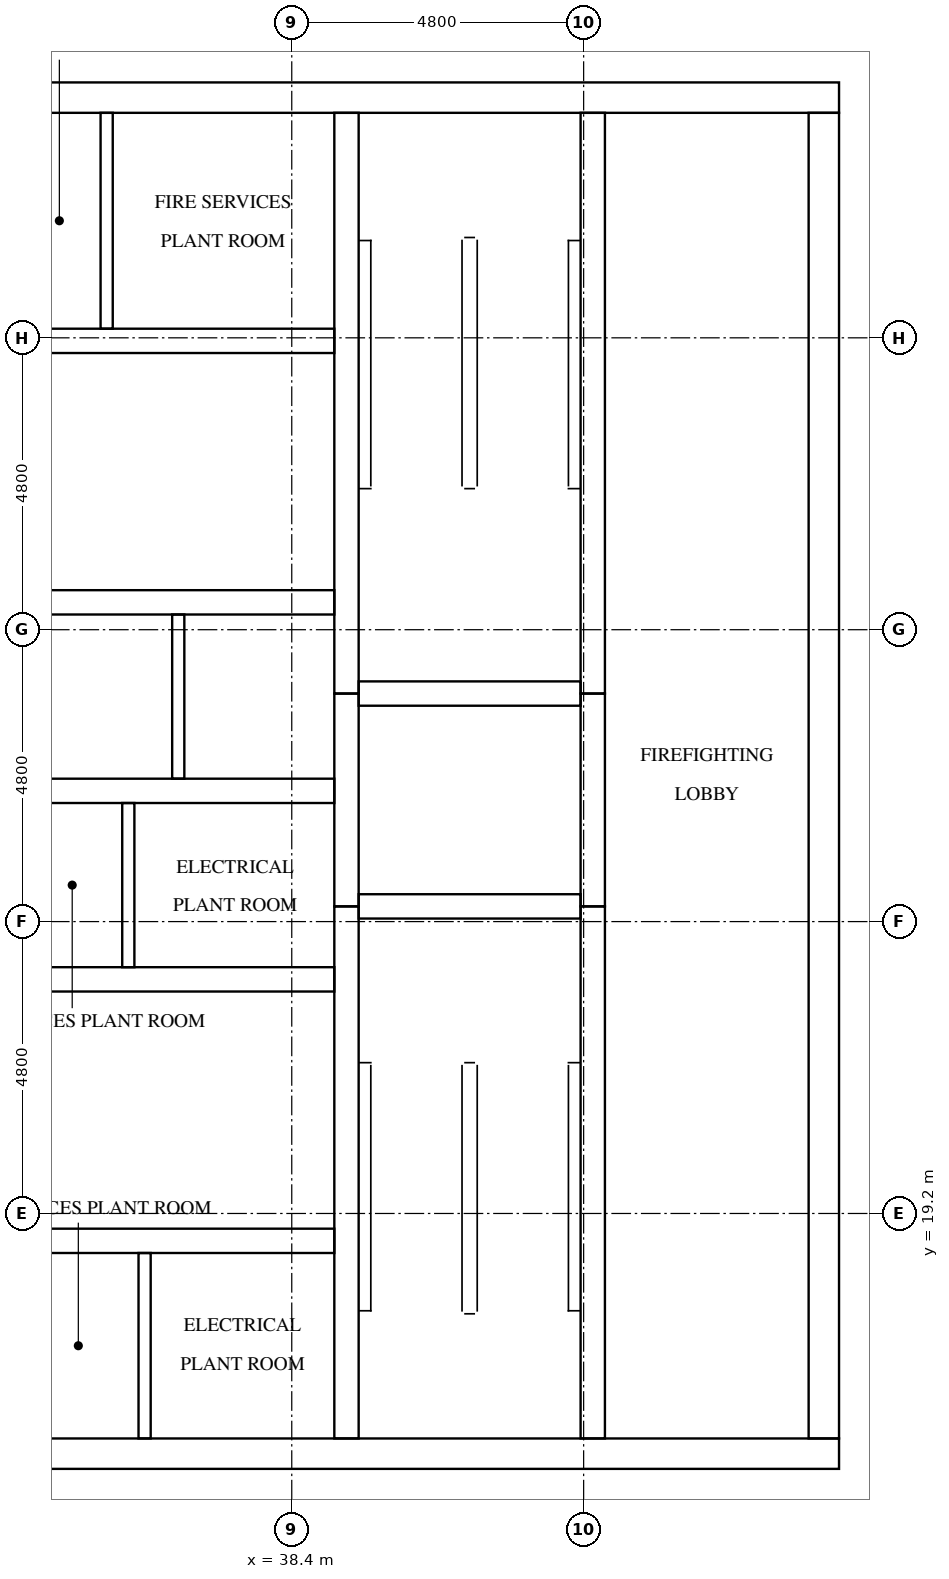
"""IFC4 building model, lengths in metres.
Left out: names, types, materials, properties, quantities, classifications, styles, units other than length and angle.
Written with IfcOpenShell. Run it as: python <this file> out.ifc"""

import sys

from ifc_helpers import new_model, si_unit, direction, frame, frame_2d, origin, place, context, subcontext, project, spatial, rectangle, extrude, element, fill, save


model = new_model("IFC4")
c1 = context("Model", 3, precision=1e-05, world=origin(), true_north=direction((0.0, 1.0)))
c2 = subcontext(c1, "Body", "Model", "MODEL_VIEW")
j1 = project(units=[si_unit("LENGTHUNIT", "METRE"), si_unit("PLANEANGLEUNIT", "RADIAN")], contexts=[c1])
p1 = place(None, origin())
s1 = spatial("IfcSite", under=j1, at=p1, CompositionType="ELEMENT")
p2 = place(p1, origin())
s2 = spatial("IfcBuilding", under=s1, at=p2, CompositionType="ELEMENT")
p3 = place(p2, frame((0.0, 0.0, 291.5)))
s3 = spatial("IfcBuildingStorey", under=s2, at=p3, CompositionType="ELEMENT", Elevation=291.5)
p4 = place(p3, frame((15.0, 15.25, 0.0), z_axis=(0.0, 0.0, 1.0), x_axis=(1.0, 0.0, 0.0)))
e1 = element("IfcWall", 1, at=p4, inside=s3, PredefinedType="SHEAR", context=c2, shape_type="SweptSolid", body=[
    extrude(rectangle(XDim=32.4, YDim=0.5, at=frame_2d((16.2, 0.0))), origin(), (0.0, 0.0, 1.0), 4.4),
])
p5 = place(p4, frame((15.3, 0.0, 0.0)))
e2 = element("IfcOpeningElement", 2, at=p5, cuts=e1, PredefinedType="OPENING", context=c2, shape_type="SweptSolid", body=[
    extrude(rectangle(XDim=1.8, YDim=2.1, at=frame_2d((0.9, 1.05))), frame((0.0, 0.26, 0.0), z_axis=(0.0, -1.0, 0.0), x_axis=(1.0, 0.0, 0.0)), (0.0, 0.0, 1.0), 0.52),
])
p6 = place(p3, frame((15.0, 37.55, 0.0), z_axis=(0.0, 0.0, 1.0), x_axis=(1.0, 0.0, 0.0)))
e3 = element("IfcWall", 3, at=p6, inside=s3, PredefinedType="SHEAR", context=c2, shape_type="SweptSolid", body=[
    extrude(rectangle(XDim=32.4, YDim=0.5, at=frame_2d((16.2, 0.0))), origin(), (0.0, 0.0, 1.0), 4.4),
])
p7 = place(p6, frame((15.3, 0.0, 0.0)))
e4 = element("IfcOpeningElement", 4, at=p7, cuts=e3, PredefinedType="OPENING", context=c2, shape_type="SweptSolid", body=[
    extrude(rectangle(XDim=1.8, YDim=2.1, at=frame_2d((0.9, 1.05))), frame((0.0, 0.26, 0.0), z_axis=(0.0, -1.0, 0.0), x_axis=(1.0, 0.0, 0.0)), (0.0, 0.0, 1.0), 0.52),
])
p8 = place(p6, frame((1.282, 0.0, 0.0)))
e5 = element("IfcOpeningElement", 5, at=p8, cuts=e3, PredefinedType="OPENING", context=c2, shape_type="SweptSolid", body=[
    extrude(rectangle(XDim=1.0, YDim=2.1, at=frame_2d((0.5, 1.05))), frame((0.0, 0.26, 0.0), z_axis=(0.0, -1.0, 0.0), x_axis=(1.0, 0.0, 0.0)), (0.0, 0.0, 1.0), 0.52),
])
p9 = place(p6, frame((5.082, 0.0, 0.0)))
e6 = element("IfcOpeningElement", 6, at=p9, cuts=e3, PredefinedType="OPENING", context=c2, shape_type="SweptSolid", body=[
    extrude(rectangle(XDim=1.0, YDim=2.1, at=frame_2d((0.5, 1.05))), frame((0.0, 0.26, 0.0), z_axis=(0.0, -1.0, 0.0), x_axis=(1.0, 0.0, 0.0)), (0.0, 0.0, 1.0), 0.52),
])
p10 = place(p3, frame((47.15, 15.5, 0.0), z_axis=(0.0, 0.0, 1.0), x_axis=(0.0, 1.0, 0.0)))
e7 = element("IfcWall", 7, at=p10, inside=s3, PredefinedType="SHEAR", context=c2, shape_type="SweptSolid", body=[
    extrude(rectangle(XDim=21.8, YDim=0.5, at=frame_2d((10.9, 0.0))), origin(), (0.0, 0.0, 1.0), 4.4),
])
p11 = place(p10, frame((10.6, 0.0, 0.0)))
e8 = element("IfcOpeningElement", 8, at=p11, cuts=e7, PredefinedType="OPENING", context=c2, shape_type="SweptSolid", body=[
    extrude(rectangle(XDim=1.2, YDim=2.1, at=frame_2d((0.6, 1.05))), frame((0.0, 0.26, 0.0), z_axis=(0.0, -1.0, 0.0), x_axis=(1.0, 0.0, 0.0)), (0.0, 0.0, 1.0), 0.52),
])
p12 = place(p3, frame((39.3, 15.5, 0.0), z_axis=(0.0, 0.0, 1.0), x_axis=(0.0, 1.0, 0.0)))
e9 = element("IfcWall", 9, at=p12, inside=s3, PredefinedType="SHEAR", context=c2, shape_type="SweptSolid", body=[
    extrude(rectangle(XDim=8.75, YDim=0.4, at=frame_2d((4.375, 0.0))), origin(), (0.0, 0.0, 1.0), 4.4),
])
p13 = place(p3, frame((39.3, 24.25, 0.0), z_axis=(0.0, 0.0, 1.0), x_axis=(0.0, 1.0, 0.0)))
e10 = element("IfcWall", 10, at=p13, inside=s3, PredefinedType="SHEAR", context=c2, shape_type="SweptSolid", body=[
    extrude(rectangle(XDim=3.5, YDim=0.4, at=frame_2d((1.75, 0.0))), origin(), (0.0, 0.0, 1.0), 4.4),
])
p14 = place(p3, frame((39.3, 27.75, 0.0), z_axis=(0.0, 0.0, 1.0), x_axis=(0.0, 1.0, 0.0)))
e11 = element("IfcWall", 11, at=p14, inside=s3, PredefinedType="SHEAR", context=c2, shape_type="SweptSolid", body=[
    extrude(rectangle(XDim=9.55, YDim=0.4, at=frame_2d((4.775, 0.0))), origin(), (0.0, 0.0, 1.0), 4.4),
])
p15 = place(p3, frame((43.35, 15.5, 0.0), z_axis=(0.0, 0.0, 1.0), x_axis=(0.0, 1.0, 0.0)))
e12 = element("IfcWall", 12, at=p15, inside=s3, PredefinedType="SHEAR", context=c2, shape_type="SweptSolid", body=[
    extrude(rectangle(XDim=8.75, YDim=0.4, at=frame_2d((4.375, 0.0))), origin(), (0.0, 0.0, 1.0), 4.4),
])
p16 = place(p15, frame((0.7, 0.0, 0.0)))
e13 = element("IfcOpeningElement", 13, at=p16, cuts=e12, PredefinedType="OPENING", context=c2, shape_type="SweptSolid", body=[
    extrude(rectangle(XDim=1.2, YDim=2.1, at=frame_2d((0.6, 1.05))), frame((0.0, 0.21, 0.0), z_axis=(0.0, -1.0, 0.0), x_axis=(1.0, 0.0, 0.0)), (0.0, 0.0, 1.0), 0.42),
])
p17 = place(p3, frame((43.35, 24.25, 0.0), z_axis=(0.0, 0.0, 1.0), x_axis=(0.0, 1.0, 0.0)))
e14 = element("IfcWall", 14, at=p17, inside=s3, PredefinedType="SHEAR", context=c2, shape_type="SweptSolid", body=[
    extrude(rectangle(XDim=3.5, YDim=0.4, at=frame_2d((1.75, 0.0))), origin(), (0.0, 0.0, 1.0), 4.4),
])
p18 = place(p17, frame((1.2, 0.0, 0.0)))
e15 = element("IfcOpeningElement", 15, at=p18, cuts=e14, PredefinedType="OPENING", context=c2, shape_type="SweptSolid", body=[
    extrude(rectangle(XDim=1.1, YDim=2.1, at=frame_2d((0.55, 1.05))), frame((0.0, 0.21, 0.0), z_axis=(0.0, -1.0, 0.0), x_axis=(1.0, 0.0, 0.0)), (0.0, 0.0, 1.0), 0.42),
])
p19 = place(p3, frame((43.35, 27.75, 0.0), z_axis=(0.0, 0.0, 1.0), x_axis=(0.0, 1.0, 0.0)))
e16 = element("IfcWall", 16, at=p19, inside=s3, PredefinedType="SHEAR", context=c2, shape_type="SweptSolid", body=[
    extrude(rectangle(XDim=9.55, YDim=0.4, at=frame_2d((4.775, 0.0))), origin(), (0.0, 0.0, 1.0), 4.4),
])
p20 = place(p19, frame((7.65, 0.0, 0.0)))
e17 = element("IfcOpeningElement", 17, at=p20, cuts=e16, PredefinedType="OPENING", context=c2, shape_type="SweptSolid", body=[
    extrude(rectangle(XDim=1.2, YDim=2.1, at=frame_2d((0.6, 1.05))), frame((0.0, 0.21, 0.0), z_axis=(0.0, -1.0, 0.0), x_axis=(1.0, 0.0, 0.0)), (0.0, 0.0, 1.0), 0.42),
])
for number, where, z_axis, x_axis in (
    (18, (39.5, 24.25, 0.0), (0.0, 0.0, 1.0), (1.0, 0.0, 0.0)),
    (19, (39.5, 27.75, 0.0), (0.0, 0.0, 1.0), (1.0, 0.0, 0.0)),
):
    element("IfcWall", number, at=place(p3, frame(where, z_axis=z_axis, x_axis=x_axis)), inside=s3, PredefinedType="SHEAR", context=c2, shape_type="SweptSolid", body=[
        extrude(rectangle(XDim=3.65, YDim=0.4, at=frame_2d((1.825, 0.0))), origin(), (0.0, 0.0, 1.0), 4.4),
    ])
p21 = place(p3, frame((33.5, 18.75, 0.0), z_axis=(0.0, 0.0, 1.0), x_axis=(1.0, 0.0, 0.0)))
e20 = element("IfcWall", 20, at=p21, inside=s3, PredefinedType="SHEAR", context=c2, shape_type="SweptSolid", body=[
    extrude(rectangle(XDim=5.6, YDim=0.4, at=frame_2d((2.8, 0.0))), origin(), (0.0, 0.0, 1.0), 4.4),
])
p22 = place(p21, frame((0.89, 0.0, 0.0)))
e21 = element("IfcOpeningElement", 21, at=p22, cuts=e20, PredefinedType="OPENING", context=c2, shape_type="SweptSolid", body=[
    extrude(rectangle(XDim=1.0, YDim=2.1, at=frame_2d((0.5, 1.05))), frame((0.0, 0.21, 0.0), z_axis=(0.0, -1.0, 0.0), x_axis=(1.0, 0.0, 0.0)), (0.0, 0.0, 1.0), 0.42),
])
p23 = place(p21, frame((3.59, 0.0, 0.0)))
e22 = element("IfcOpeningElement", 22, at=p23, cuts=e20, PredefinedType="OPENING", context=c2, shape_type="SweptSolid", body=[
    extrude(rectangle(XDim=1.0, YDim=2.1, at=frame_2d((0.5, 1.05))), frame((0.0, 0.21, 0.0), z_axis=(0.0, -1.0, 0.0), x_axis=(1.0, 0.0, 0.0)), (0.0, 0.0, 1.0), 0.42),
])
p24 = place(p3, frame((23.3, 23.05, 0.0), z_axis=(0.0, 0.0, 1.0), x_axis=(1.0, 0.0, 0.0)))
e23 = element("IfcWall", 23, at=p24, inside=s3, PredefinedType="SHEAR", context=c2, shape_type="SweptSolid", body=[
    extrude(rectangle(XDim=15.8, YDim=0.4, at=frame_2d((7.9, 0.0))), origin(), (0.0, 0.0, 1.0), 4.4),
])
p25 = place(p24, frame((6.017, 0.0, 0.0)))
e24 = element("IfcOpeningElement", 24, at=p25, cuts=e23, PredefinedType="OPENING", context=c2, shape_type="SweptSolid", body=[
    extrude(rectangle(XDim=1.1, YDim=2.1, at=frame_2d((0.55, 1.05))), frame((0.0, 0.21, 0.0), z_axis=(0.0, -1.0, 0.0), x_axis=(1.0, 0.0, 0.0)), (0.0, 0.0, 1.0), 0.42),
])
p26 = place(p24, frame((8.683, 0.0, 0.0)))
e25 = element("IfcOpeningElement", 25, at=p26, cuts=e23, PredefinedType="OPENING", context=c2, shape_type="SweptSolid", body=[
    extrude(rectangle(XDim=1.1, YDim=2.1, at=frame_2d((0.55, 1.05))), frame((0.0, 0.21, 0.0), z_axis=(0.0, -1.0, 0.0), x_axis=(1.0, 0.0, 0.0)), (0.0, 0.0, 1.0), 0.42),
])
p27 = place(p24, frame((0.323, 0.0, 0.0)))
e26 = element("IfcOpeningElement", 26, at=p27, cuts=e23, PredefinedType="OPENING", context=c2, shape_type="SweptSolid", body=[
    extrude(rectangle(XDim=1.0, YDim=2.1, at=frame_2d((0.5, 1.05))), frame((0.0, 0.21, 0.0), z_axis=(0.0, -1.0, 0.0), x_axis=(1.0, 0.0, 0.0)), (0.0, 0.0, 1.0), 0.42),
])
p28 = place(p24, frame((2.989, 0.0, 0.0)))
e27 = element("IfcOpeningElement", 27, at=p28, cuts=e23, PredefinedType="OPENING", context=c2, shape_type="SweptSolid", body=[
    extrude(rectangle(XDim=1.0, YDim=2.1, at=frame_2d((0.5, 1.05))), frame((0.0, 0.21, 0.0), z_axis=(0.0, -1.0, 0.0), x_axis=(1.0, 0.0, 0.0)), (0.0, 0.0, 1.0), 0.42),
])
p29 = place(p24, frame((10.989, 0.0, 0.0)))
e28 = element("IfcOpeningElement", 28, at=p29, cuts=e23, PredefinedType="OPENING", context=c2, shape_type="SweptSolid", body=[
    extrude(rectangle(XDim=1.0, YDim=2.1, at=frame_2d((0.5, 1.05))), frame((0.0, 0.21, 0.0), z_axis=(0.0, -1.0, 0.0), x_axis=(1.0, 0.0, 0.0)), (0.0, 0.0, 1.0), 0.42),
])
p30 = place(p24, frame((13.656, 0.0, 0.0)))
e29 = element("IfcOpeningElement", 29, at=p30, cuts=e23, PredefinedType="OPENING", context=c2, shape_type="SweptSolid", body=[
    extrude(rectangle(XDim=1.0, YDim=2.1, at=frame_2d((0.5, 1.05))), frame((0.0, 0.21, 0.0), z_axis=(0.0, -1.0, 0.0), x_axis=(1.0, 0.0, 0.0)), (0.0, 0.0, 1.0), 0.42),
])
p31 = place(p3, frame((23.3, 26.15, 0.0), z_axis=(0.0, 0.0, 1.0), x_axis=(1.0, 0.0, 0.0)))
e30 = element("IfcWall", 30, at=p31, inside=s3, PredefinedType="SHEAR", context=c2, shape_type="SweptSolid", body=[
    extrude(rectangle(XDim=15.8, YDim=0.4, at=frame_2d((7.9, 0.0))), origin(), (0.0, 0.0, 1.0), 4.4),
])
p32 = place(p3, frame((23.3, 29.25, 0.0), z_axis=(0.0, 0.0, 1.0), x_axis=(1.0, 0.0, 0.0)))
e31 = element("IfcWall", 31, at=p32, inside=s3, PredefinedType="SHEAR", context=c2, shape_type="SweptSolid", body=[
    extrude(rectangle(XDim=15.8, YDim=0.4, at=frame_2d((7.9, 0.0))), origin(), (0.0, 0.0, 1.0), 4.4),
])
p33 = place(p32, frame((0.683, 0.0, 0.0)))
e32 = element("IfcOpeningElement", 32, at=p33, cuts=e31, PredefinedType="OPENING", context=c2, shape_type="SweptSolid", body=[
    extrude(rectangle(XDim=1.1, YDim=2.1, at=frame_2d((0.55, 1.05))), frame((0.0, 0.21, 0.0), z_axis=(0.0, -1.0, 0.0), x_axis=(1.0, 0.0, 0.0)), (0.0, 0.0, 1.0), 0.42),
])
p34 = place(p32, frame((3.35, 0.0, 0.0)))
e33 = element("IfcOpeningElement", 33, at=p34, cuts=e31, PredefinedType="OPENING", context=c2, shape_type="SweptSolid", body=[
    extrude(rectangle(XDim=1.1, YDim=2.1, at=frame_2d((0.55, 1.05))), frame((0.0, 0.21, 0.0), z_axis=(0.0, -1.0, 0.0), x_axis=(1.0, 0.0, 0.0)), (0.0, 0.0, 1.0), 0.42),
])
p35 = place(p32, frame((6.017, 0.0, 0.0)))
e34 = element("IfcOpeningElement", 34, at=p35, cuts=e31, PredefinedType="OPENING", context=c2, shape_type="SweptSolid", body=[
    extrude(rectangle(XDim=1.1, YDim=2.1, at=frame_2d((0.55, 1.05))), frame((0.0, 0.21, 0.0), z_axis=(0.0, -1.0, 0.0), x_axis=(1.0, 0.0, 0.0)), (0.0, 0.0, 1.0), 0.42),
])
p36 = place(p32, frame((8.683, 0.0, 0.0)))
e35 = element("IfcOpeningElement", 35, at=p36, cuts=e31, PredefinedType="OPENING", context=c2, shape_type="SweptSolid", body=[
    extrude(rectangle(XDim=1.1, YDim=2.1, at=frame_2d((0.55, 1.05))), frame((0.0, 0.21, 0.0), z_axis=(0.0, -1.0, 0.0), x_axis=(1.0, 0.0, 0.0)), (0.0, 0.0, 1.0), 0.42),
])
p37 = place(p32, frame((11.35, 0.0, 0.0)))
e36 = element("IfcOpeningElement", 36, at=p37, cuts=e31, PredefinedType="OPENING", context=c2, shape_type="SweptSolid", body=[
    extrude(rectangle(XDim=1.1, YDim=2.1, at=frame_2d((0.55, 1.05))), frame((0.0, 0.21, 0.0), z_axis=(0.0, -1.0, 0.0), x_axis=(1.0, 0.0, 0.0)), (0.0, 0.0, 1.0), 0.42),
])
p38 = place(p32, frame((14.017, 0.0, 0.0)))
e37 = element("IfcOpeningElement", 37, at=p38, cuts=e31, PredefinedType="OPENING", context=c2, shape_type="SweptSolid", body=[
    extrude(rectangle(XDim=1.1, YDim=2.1, at=frame_2d((0.55, 1.05))), frame((0.0, 0.21, 0.0), z_axis=(0.0, -1.0, 0.0), x_axis=(1.0, 0.0, 0.0)), (0.0, 0.0, 1.0), 0.42),
])
p39 = place(p3, frame((33.5, 33.55, 0.0), z_axis=(0.0, 0.0, 1.0), x_axis=(1.0, 0.0, 0.0)))
e38 = element("IfcWall", 38, at=p39, inside=s3, PredefinedType="SHEAR", context=c2, shape_type="SweptSolid", body=[
    extrude(rectangle(XDim=5.6, YDim=0.4, at=frame_2d((2.8, 0.0))), origin(), (0.0, 0.0, 1.0), 4.4),
])
p40 = place(p39, frame((0.578, 0.0, 0.0)))
e39 = element("IfcOpeningElement", 39, at=p40, cuts=e38, PredefinedType="OPENING", context=c2, shape_type="SweptSolid", body=[
    extrude(rectangle(XDim=1.0, YDim=2.1, at=frame_2d((0.5, 1.05))), frame((0.0, 0.21, 0.0), z_axis=(0.0, -1.0, 0.0), x_axis=(1.0, 0.0, 0.0)), (0.0, 0.0, 1.0), 0.42),
])
p41 = place(p39, frame((3.278, 0.0, 0.0)))
e40 = element("IfcOpeningElement", 40, at=p41, cuts=e38, PredefinedType="OPENING", context=c2, shape_type="SweptSolid", body=[
    extrude(rectangle(XDim=1.0, YDim=2.1, at=frame_2d((0.5, 1.05))), frame((0.0, 0.21, 0.0), z_axis=(0.0, -1.0, 0.0), x_axis=(1.0, 0.0, 0.0)), (0.0, 0.0, 1.0), 0.42),
])
p42 = place(p3, frame((36.533, 26.35, 0.0), z_axis=(0.0, 0.0, 1.0), x_axis=(0.0, 1.0, 0.0)))
e41 = element("IfcWall", 41, at=p42, inside=s3, PredefinedType="SOLIDWALL", context=c2, shape_type="SweptSolid", body=[
    extrude(rectangle(XDim=2.7, YDim=0.2, at=frame_2d((1.35, 0.0))), origin(), (0.0, 0.0, 1.0), 4.4),
])
p43 = place(p3, frame((35.712, 23.25, 0.0), z_axis=(0.0, 0.0, 1.0), x_axis=(0.0, 1.0, 0.0)))
e42 = element("IfcWall", 42, at=p43, inside=s3, PredefinedType="PARTITIONING", context=c2, shape_type="SweptSolid", body=[
    extrude(rectangle(XDim=2.7, YDim=0.2, at=frame_2d((1.35, 0.0))), origin(), (0.0, 0.0, 1.0), 4.4),
])
p44 = place(p3, frame((35.98, 15.5, 0.0), z_axis=(0.0, 0.0, 1.0), x_axis=(0.0, 1.0, 0.0)))
e43 = element("IfcWall", 43, at=p44, inside=s3, PredefinedType="PARTITIONING", context=c2, shape_type="SweptSolid", body=[
    extrude(rectangle(XDim=3.05, YDim=0.2, at=frame_2d((1.525, 0.0))), origin(), (0.0, 0.0, 1.0), 4.4),
])
p45 = place(p3, frame((35.356, 33.75, 0.0), z_axis=(0.0, 0.0, 1.0), x_axis=(0.0, 1.0, 0.0)))
e44 = element("IfcWall", 44, at=p45, inside=s3, PredefinedType="PARTITIONING", context=c2, shape_type="SweptSolid", body=[
    extrude(rectangle(XDim=3.55, YDim=0.2, at=frame_2d((1.775, 0.0))), origin(), (0.0, 0.0, 1.0), 4.4),
])
p46 = place(p37, origin())
e45 = element("IfcDoor", 45, at=p46, inside=s3, OperationType="DOUBLE_DOOR_SLIDING", PredefinedType="DOOR", context=c2, shape_type="SweptSolid", body=[
    extrude(rectangle(XDim=1.1, YDim=2.1, at=frame_2d((0.55, 1.05))), frame((0.0, 0.025, 0.0), z_axis=(0.0, -1.0, 0.0), x_axis=(1.0, 0.0, 0.0)), (0.0, 0.0, 1.0), 0.05),
])
fill(e36, e45)
p47 = place(p38, origin())
e46 = element("IfcDoor", 46, at=p47, inside=s3, OperationType="DOUBLE_DOOR_SLIDING", PredefinedType="DOOR", context=c2, shape_type="SweptSolid", body=[
    extrude(rectangle(XDim=1.1, YDim=2.1, at=frame_2d((0.55, 1.05))), frame((0.0, 0.025, 0.0), z_axis=(0.0, -1.0, 0.0), x_axis=(1.0, 0.0, 0.0)), (0.0, 0.0, 1.0), 0.05),
])
fill(e37, e46)
p48 = place(p18, origin())
e47 = element("IfcDoor", 47, at=p48, inside=s3, OperationType="DOUBLE_DOOR_SLIDING", PredefinedType="DOOR", context=c2, shape_type="SweptSolid", body=[
    extrude(rectangle(XDim=1.1, YDim=2.1, at=frame_2d((0.55, 1.05))), frame((0.0, 0.025, 0.0), z_axis=(0.0, -1.0, 0.0), x_axis=(1.0, 0.0, 0.0)), (0.0, 0.0, 1.0), 0.05),
])
fill(e15, e47)
p49 = place(p16, origin())
e48 = element("IfcDoor", 48, at=p49, inside=s3, OperationType="SINGLE_SWING_LEFT", PredefinedType="DOOR", context=c2, shape_type="SweptSolid", body=[
    extrude(rectangle(XDim=1.2, YDim=2.1, at=frame_2d((0.6, 1.05))), frame((0.0, 0.025, 0.0), z_axis=(0.0, -1.0, 0.0), x_axis=(1.0, 0.0, 0.0)), (0.0, 0.0, 1.0), 0.05),
])
fill(e13, e48)
p50 = place(p20, origin())
e49 = element("IfcDoor", 49, at=p50, inside=s3, OperationType="SINGLE_SWING_RIGHT", PredefinedType="DOOR", context=c2, shape_type="SweptSolid", body=[
    extrude(rectangle(XDim=1.2, YDim=2.1, at=frame_2d((0.6, 1.05))), frame((0.0, 0.025, 0.0), z_axis=(0.0, -1.0, 0.0), x_axis=(1.0, 0.0, 0.0)), (0.0, 0.0, 1.0), 0.05),
])
fill(e17, e49)
p51 = place(p11, origin())
e50 = element("IfcDoor", 50, at=p51, inside=s3, OperationType="SINGLE_SWING_RIGHT", PredefinedType="DOOR", context=c2, shape_type="SweptSolid", body=[
    extrude(rectangle(XDim=1.2, YDim=2.1, at=frame_2d((0.6, 1.05))), frame((0.0, 0.025, 0.0), z_axis=(0.0, -1.0, 0.0), x_axis=(1.0, 0.0, 0.0)), (0.0, 0.0, 1.0), 0.05),
])
fill(e8, e50)
p52 = place(p29, frame((1.0, 0.0, 0.0), z_axis=(0.0, 0.0, 1.0), x_axis=(-1.0, 0.0, 0.0)))
e51 = element("IfcDoor", 51, at=p52, inside=s3, OperationType="SINGLE_SWING_LEFT", PredefinedType="DOOR", context=c2, shape_type="SweptSolid", body=[
    extrude(rectangle(XDim=1.0, YDim=2.1, at=frame_2d((0.5, 1.05))), frame((0.0, 0.025, 0.0), z_axis=(0.0, -1.0, 0.0), x_axis=(1.0, 0.0, 0.0)), (0.0, 0.0, 1.0), 0.05),
])
fill(e28, e51)
p53 = place(p30, frame((1.0, 0.0, 0.0), z_axis=(0.0, 0.0, 1.0), x_axis=(-1.0, 0.0, 0.0)))
e52 = element("IfcDoor", 52, at=p53, inside=s3, OperationType="SINGLE_SWING_RIGHT", PredefinedType="DOOR", context=c2, shape_type="SweptSolid", body=[
    extrude(rectangle(XDim=1.0, YDim=2.1, at=frame_2d((0.5, 1.05))), frame((0.0, 0.025, 0.0), z_axis=(0.0, -1.0, 0.0), x_axis=(1.0, 0.0, 0.0)), (0.0, 0.0, 1.0), 0.05),
])
fill(e29, e52)
p54 = place(p22, origin())
e53 = element("IfcDoor", 53, at=p54, inside=s3, OperationType="SINGLE_SWING_LEFT", PredefinedType="DOOR", context=c2, shape_type="SweptSolid", body=[
    extrude(rectangle(XDim=1.0, YDim=2.1, at=frame_2d((0.5, 1.05))), frame((0.0, 0.025, 0.0), z_axis=(0.0, -1.0, 0.0), x_axis=(1.0, 0.0, 0.0)), (0.0, 0.0, 1.0), 0.05),
])
fill(e21, e53)
p55 = place(p23, origin())
e54 = element("IfcDoor", 54, at=p55, inside=s3, OperationType="SINGLE_SWING_RIGHT", PredefinedType="DOOR", context=c2, shape_type="SweptSolid", body=[
    extrude(rectangle(XDim=1.0, YDim=2.1, at=frame_2d((0.5, 1.05))), frame((0.0, 0.025, 0.0), z_axis=(0.0, -1.0, 0.0), x_axis=(1.0, 0.0, 0.0)), (0.0, 0.0, 1.0), 0.05),
])
fill(e22, e54)
p56 = place(p40, frame((1.0, 0.0, 0.0), z_axis=(0.0, 0.0, 1.0), x_axis=(-1.0, 0.0, 0.0)))
e55 = element("IfcDoor", 55, at=p56, inside=s3, OperationType="SINGLE_SWING_LEFT", PredefinedType="DOOR", context=c2, shape_type="SweptSolid", body=[
    extrude(rectangle(XDim=1.0, YDim=2.1, at=frame_2d((0.5, 1.05))), frame((0.0, 0.025, 0.0), z_axis=(0.0, -1.0, 0.0), x_axis=(1.0, 0.0, 0.0)), (0.0, 0.0, 1.0), 0.05),
])
fill(e39, e55)
p57 = place(p41, frame((1.0, 0.0, 0.0), z_axis=(0.0, 0.0, 1.0), x_axis=(-1.0, 0.0, 0.0)))
e56 = element("IfcDoor", 56, at=p57, inside=s3, OperationType="SINGLE_SWING_RIGHT", PredefinedType="DOOR", context=c2, shape_type="SweptSolid", body=[
    extrude(rectangle(XDim=1.0, YDim=2.1, at=frame_2d((0.5, 1.05))), frame((0.0, 0.025, 0.0), z_axis=(0.0, -1.0, 0.0), x_axis=(1.0, 0.0, 0.0)), (0.0, 0.0, 1.0), 0.05),
])
fill(e40, e56)
save(model, sys.argv[1])
